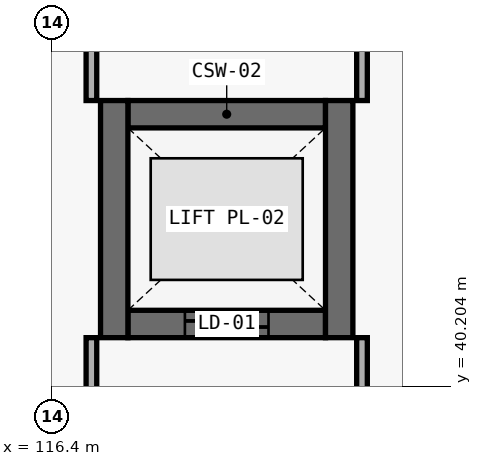
"""IFC4 building model, lengths in metres.
Left out: names, types, materials, properties, quantities, classifications, styles, units other than length and angle.
Written with IfcOpenShell. Run it as: python <this file> out.ifc"""

import sys

from ifc_helpers import new_model, si_unit, direction, frame, frame_2d, origin, place, context, subcontext, project, spatial, rectangle, extrude, element, fill, save


model = new_model("IFC4")
c1 = context("Model", 3, precision=1e-05, world=origin(), true_north=direction((0.0, 1.0)))
c2 = subcontext(c1, "Body", "Model", "MODEL_VIEW")
j1 = project(units=[si_unit("LENGTHUNIT", "METRE"), si_unit("PLANEANGLEUNIT", "RADIAN")], contexts=[c1])
p1 = place(None, origin())
s1 = spatial("IfcSite", under=j1, at=p1, CompositionType="ELEMENT")
p2 = place(p1, origin())
s2 = spatial("IfcBuilding", under=s1, at=p2, CompositionType="ELEMENT")
p3 = place(p2, frame((0.0, 0.0, 4.8)))
s3 = spatial("IfcBuildingStorey", under=s2, at=p3, CompositionType="ELEMENT", Elevation=4.8)
p4 = place(p3, frame((117.4, 43.78, 0.0), z_axis=(0.0, 0.0, 1.0), x_axis=(1.0, 0.0, 0.0)))
e1 = element("IfcWall", 1, at=p4, inside=s3, PredefinedType="SHEAR", context=c2, shape_type="SweptSolid", body=[
    extrude(rectangle(XDim=2.6, YDim=0.36, at=frame_2d((1.3, 0.0))), origin(), (0.0, 0.0, 1.0), 3.88),
])
p5 = place(p3, frame((117.4, 41.02, 0.0), z_axis=(0.0, 0.0, 1.0), x_axis=(1.0, 0.0, 0.0)))
e2 = element("IfcWall", 2, at=p5, inside=s3, PredefinedType="SHEAR", context=c2, shape_type="SweptSolid", body=[
    extrude(rectangle(XDim=2.6, YDim=0.36, at=frame_2d((1.3, 0.0))), origin(), (0.0, 0.0, 1.0), 3.88),
])
p6 = place(p5, frame((0.75, 0.0, 0.0)))
e3 = element("IfcOpeningElement", 3, at=p6, cuts=e2, PredefinedType="OPENING", context=c2, shape_type="SweptSolid", body=[
    extrude(rectangle(XDim=1.1, YDim=2.15, at=frame_2d((0.55, 1.075))), frame((0.0, 0.195, 0.0), z_axis=(0.0, -1.0, 0.0), x_axis=(1.0, 0.0, 0.0)), (0.0, 0.0, 1.0), 0.39),
])
for number, where, z_axis, x_axis in (
    (4, (117.22, 40.84, 0.0), (0.0, 0.0, 1.0), (0.0, 1.0, 0.0)),
    (5, (120.18, 40.84, 0.0), (0.0, 0.0, 1.0), (0.0, 1.0, 0.0)),
):
    element("IfcWall", number, at=place(p3, frame(where, z_axis=z_axis, x_axis=x_axis)), inside=s3, PredefinedType="SHEAR", context=c2, shape_type="SweptSolid", body=[
        extrude(rectangle(XDim=3.12, YDim=0.36, at=frame_2d((1.56, 0.0))), origin(), (0.0, 0.0, 1.0), 3.88),
    ])
p7 = place(p3, frame((116.92, 39.975, 0.0), z_axis=(0.0, 0.0, 1.0), x_axis=(0.0, 1.0, 0.0)))
e6 = element("IfcWall", 6, at=p7, inside=s3, PredefinedType="PARTITIONING", context=c2, shape_type="SweptSolid", body=[
    extrude(rectangle(XDim=0.865, YDim=0.14, at=frame_2d((0.433, 0.0))), origin(), (0.0, 0.0, 1.0), 2.76),
])
p8 = place(p3, frame((116.92, 43.96, 0.0), z_axis=(0.0, 0.0, 1.0), x_axis=(0.0, 1.0, 0.0)))
e7 = element("IfcWall", 7, at=p8, inside=s3, PredefinedType="PARTITIONING", context=c2, shape_type="SweptSolid", body=[
    extrude(rectangle(XDim=1.85, YDim=0.14, at=frame_2d((0.925, 0.0))), origin(), (0.0, 0.0, 1.0), 2.76),
])
p9 = place(p3, frame((120.48, 20.15, 0.0), z_axis=(0.0, 0.0, 1.0), x_axis=(0.0, 1.0, 0.0)))
e8 = element("IfcWall", 8, at=p9, inside=s3, PredefinedType="PARTITIONING", context=c2, shape_type="SweptSolid", body=[
    extrude(rectangle(XDim=20.69, YDim=0.14, at=frame_2d((10.345, 0.0))), origin(), (0.0, 0.0, 1.0), 2.76),
])
p10 = place(p3, frame((120.48, 43.96, 0.0), z_axis=(0.0, 0.0, 1.0), x_axis=(0.0, 1.0, 0.0)))
e9 = element("IfcWall", 9, at=p10, inside=s3, PredefinedType="PARTITIONING", context=c2, shape_type="SweptSolid", body=[
    extrude(rectangle(XDim=1.85, YDim=0.14, at=frame_2d((0.925, 0.0))), origin(), (0.0, 0.0, 1.0), 2.76),
])
p11 = place(p6, origin())
e10 = element("IfcDoor", 10, at=p11, inside=s3, OperationType="DOUBLE_DOOR_SLIDING", PredefinedType="DOOR", context=c2, shape_type="SweptSolid", body=[
    extrude(rectangle(XDim=1.1, YDim=2.15, at=frame_2d((0.55, 1.075))), frame((0.0, 0.025, 0.0), z_axis=(0.0, -1.0, 0.0), x_axis=(1.0, 0.0, 0.0)), (0.0, 0.0, 1.0), 0.05),
])
fill(e3, e10)
save(model, sys.argv[1])
